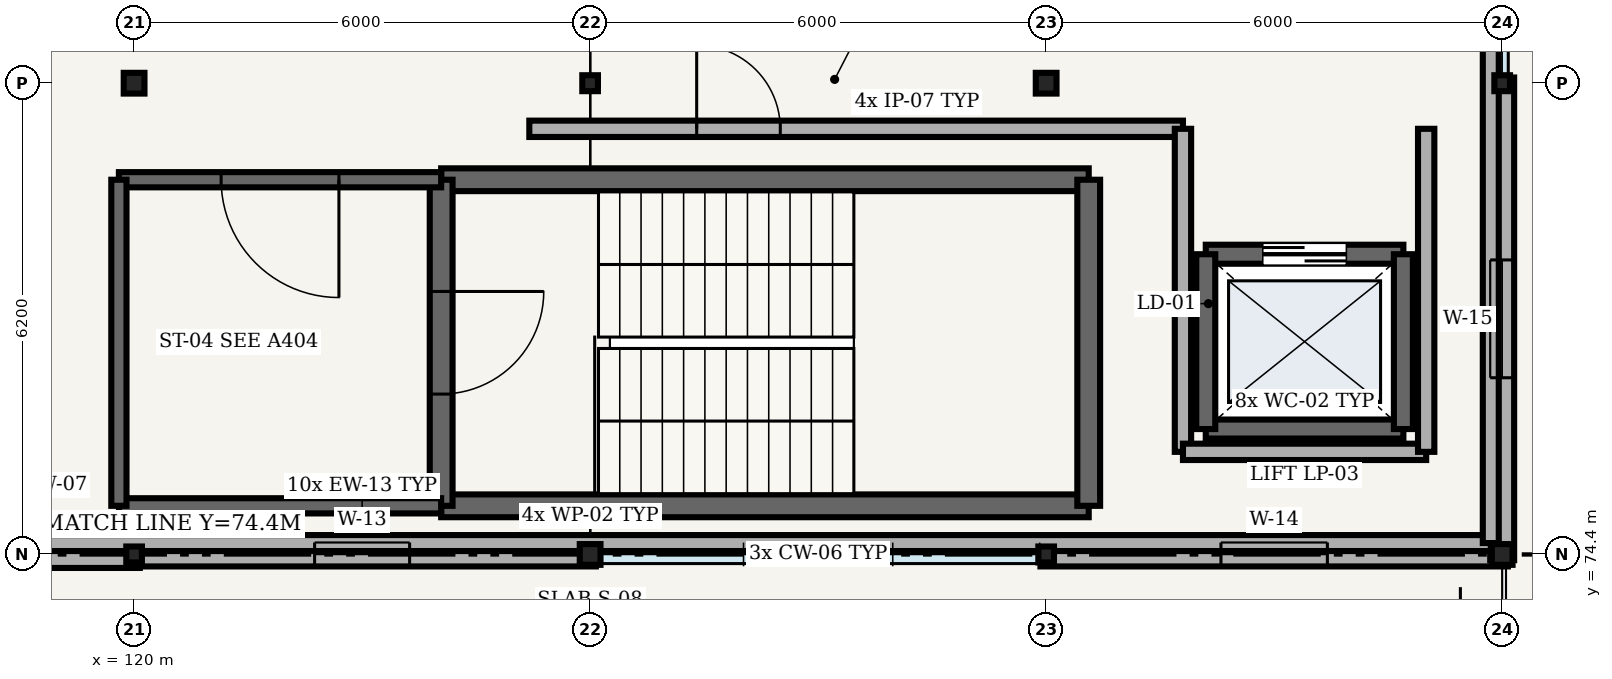
"""IFC4 building model, lengths in metres.
Left out: names, types, materials, properties, quantities, classifications, styles, units other than length and angle.
Written with IfcOpenShell. Run it as: python <this file> out.ifc"""

import sys

from ifc_helpers import new_model, si_unit, direction, frame, frame_2d, origin, origin_2d, place, context, subcontext, project, spatial, rectangle, hollow_circle, i_section, extrude, element, fill, save


model = new_model("IFC4")
c1 = context("Model", 3, precision=1e-05, world=origin(), true_north=direction((0.0, 1.0)))
c2 = subcontext(c1, "Body", "Model", "MODEL_VIEW")
j1 = project(units=[si_unit("LENGTHUNIT", "METRE"), si_unit("PLANEANGLEUNIT", "RADIAN")], contexts=[c1])
p1 = place(None, origin())
s1 = spatial("IfcSite", under=j1, at=p1, CompositionType="ELEMENT")
p2 = place(p1, origin())
s2 = spatial("IfcBuilding", under=s1, at=p2, CompositionType="ELEMENT")
p3 = place(p2, frame((0.0, 0.0, 25.2)))
s3 = spatial("IfcBuildingStorey", under=s2, at=p3, CompositionType="ELEMENT", Elevation=25.2)
p4 = place(p3, frame((120.0, 74.4, 0.0), z_axis=(0.0, 0.0, 1.0), x_axis=(1.0, 0.0, 0.0)))
e1 = element("IfcColumn", 1, at=p4, inside=s3, PredefinedType="COLUMN", context=c2, shape_type="SweptSolid", body=[
    extrude(i_section(OverallWidth=0.206, OverallDepth=0.21, WebThickness=0.01, FlangeThickness=0.014, FilletRadius=0.01, at=origin_2d()), origin(), (0.0, 0.0, 1.0), 4.41),
])
for number, where, z_axis, x_axis in (
    (2, (120.0, 80.6, 0.0), (0.0, 0.0, 1.0), (1.0, 0.0, 0.0)),
    (3, (126.0, 74.4, 0.0), (0.0, 0.0, 1.0), (1.0, 0.0, 0.0)),
):
    element("IfcColumn", number, at=place(p3, frame(where, z_axis=z_axis, x_axis=x_axis)), inside=s3, PredefinedType="COLUMN", context=c2, shape_type="SweptSolid", body=[
        extrude(hollow_circle(Radius=0.136, WallThickness=0.01, at=origin_2d()), origin(), (0.0, 0.0, 1.0), 4.41),
    ])
for number, where, z_axis, x_axis in (
    (4, (126.0, 80.6, 0.0), (0.0, 0.0, 1.0), (1.0, 0.0, 0.0)),
    (5, (132.0, 74.4, 0.0), (0.0, 0.0, 1.0), (1.0, 0.0, 0.0)),
):
    element("IfcColumn", number, at=place(p3, frame(where, z_axis=z_axis, x_axis=x_axis)), inside=s3, PredefinedType="COLUMN", context=c2, shape_type="SweptSolid", body=[
        extrude(i_section(OverallWidth=0.206, OverallDepth=0.21, WebThickness=0.01, FlangeThickness=0.014, FilletRadius=0.01, at=origin_2d()), origin(), (0.0, 0.0, 1.0), 4.41),
    ])
for number, where, z_axis, x_axis in (
    (6, (132.0, 80.6, 0.0), (0.0, 0.0, 1.0), (1.0, 0.0, 0.0)),
    (7, (138.0, 74.4, 0.0), (0.0, 0.0, 1.0), (1.0, 0.0, 0.0)),
):
    element("IfcColumn", number, at=place(p3, frame(where, z_axis=z_axis, x_axis=x_axis)), inside=s3, PredefinedType="COLUMN", context=c2, shape_type="SweptSolid", body=[
        extrude(hollow_circle(Radius=0.136, WallThickness=0.01, at=origin_2d()), origin(), (0.0, 0.0, 1.0), 4.41),
    ])
p5 = place(p3, frame((138.0, 80.6, 0.0), z_axis=(0.0, 0.0, 1.0), x_axis=(1.0, 0.0, 0.0)))
e8 = element("IfcColumn", 8, at=p5, inside=s3, PredefinedType="COLUMN", context=c2, shape_type="SweptSolid", body=[
    extrude(i_section(OverallWidth=0.206, OverallDepth=0.21, WebThickness=0.01, FlangeThickness=0.014, FilletRadius=0.01, at=origin_2d()), origin(), (0.0, 0.0, 1.0), 4.41),
])
p6 = place(p3, frame((113.925, 74.4, 0.0), z_axis=(0.0, 0.0, 1.0), x_axis=(1.0, 0.0, 0.0)))
e9 = element("IfcWall", 9, at=p6, inside=s3, PredefinedType="SOLIDWALL", context=c2, shape_type="SweptSolid", body=[
    extrude(rectangle(XDim=6.15, YDim=0.355, at=frame_2d((3.075, 0.0))), origin(), (0.0, 0.0, 1.0), 3.92),
])
p7 = place(p6, frame((2.475, 0.0, 0.0)))
e10 = element("IfcOpeningElement", 10, at=p7, cuts=e9, PredefinedType="OPENING", context=c2, shape_type="SweptSolid", body=[
    extrude(rectangle(XDim=1.2, YDim=2.2, at=frame_2d((0.6, 1.1))), frame((0.0, 0.188, 0.0), z_axis=(0.0, -1.0, 0.0), x_axis=(1.0, 0.0, 0.0)), (0.0, 0.0, 1.0), 0.375),
])
p8 = place(p3, frame((119.925, 74.4, 0.0), z_axis=(0.0, 0.0, 1.0), x_axis=(1.0, 0.0, 0.0)))
e11 = element("IfcWall", 11, at=p8, inside=s3, PredefinedType="SOLIDWALL", context=c2, shape_type="SweptSolid", body=[
    extrude(rectangle(XDim=6.15, YDim=0.315, at=frame_2d((3.075, 0.0))), origin(), (0.0, 0.0, 1.0), 3.92),
])
p9 = place(p8, frame((2.45, 0.0, 0.9)))
e12 = element("IfcOpeningElement", 12, at=p9, cuts=e11, PredefinedType="OPENING", context=c2, shape_type="SweptSolid", body=[
    extrude(rectangle(XDim=1.25, YDim=1.5, at=frame_2d((0.625, 0.75))), frame((0.0, 0.167, 0.0), z_axis=(0.0, -1.0, 0.0), x_axis=(1.0, 0.0, 0.0)), (0.0, 0.0, 1.0), 0.335),
])
p10 = place(p3, frame((131.925, 74.4, 0.0), z_axis=(0.0, 0.0, 1.0), x_axis=(1.0, 0.0, 0.0)))
e13 = element("IfcWall", 13, at=p10, inside=s3, PredefinedType="SOLIDWALL", context=c2, shape_type="SweptSolid", body=[
    extrude(rectangle(XDim=6.15, YDim=0.315, at=frame_2d((3.075, 0.0))), origin(), (0.0, 0.0, 1.0), 3.92),
])
p11 = place(p10, frame((2.375, 0.0, 0.9)))
e14 = element("IfcOpeningElement", 14, at=p11, cuts=e13, PredefinedType="OPENING", context=c2, shape_type="SweptSolid", body=[
    extrude(rectangle(XDim=1.4, YDim=1.5, at=frame_2d((0.7, 0.75))), frame((0.0, 0.167, 0.0), z_axis=(0.0, -1.0, 0.0), x_axis=(1.0, 0.0, 0.0)), (0.0, 0.0, 1.0), 0.335),
])
p12 = place(p3, frame((138.0, 74.325, 0.0), z_axis=(0.0, 0.0, 1.0), x_axis=(0.0, 1.0, 0.0)))
e15 = element("IfcWall", 15, at=p12, inside=s3, PredefinedType="SOLIDWALL", context=c2, shape_type="SweptSolid", body=[
    extrude(rectangle(XDim=6.35, YDim=0.315, at=frame_2d((3.175, 0.0))), origin(), (0.0, 0.0, 1.0), 3.92),
])
p13 = place(p12, frame((2.4, 0.0, 0.9)))
e16 = element("IfcOpeningElement", 16, at=p13, cuts=e15, PredefinedType="OPENING", context=c2, shape_type="SweptSolid", body=[
    extrude(rectangle(XDim=1.55, YDim=1.5, at=frame_2d((0.775, 0.75))), frame((0.0, 0.167, 0.0), z_axis=(0.0, -1.0, 0.0), x_axis=(1.0, 0.0, 0.0)), (0.0, 0.0, 1.0), 0.335),
])
p14 = place(p3, frame((114.15, 74.55, 4.6), z_axis=(0.0, 0.0, 1.0), x_axis=(1.0, 0.0, 0.0)))
e17 = element("IfcWall", 17, at=p14, inside=s3, PredefinedType="PARAPET", context=c2, shape_type="SweptSolid", body=[
    extrude(rectangle(XDim=23.7, YDim=0.21, at=frame_2d((11.85, 0.0))), origin(), (0.0, 0.0, 1.0), 0.9),
])
p15 = place(p3, frame((137.85, 74.55, 4.6), z_axis=(0.0, 0.0, 1.0), x_axis=(0.0, 1.0, 0.0)))
e18 = element("IfcWall", 18, at=p15, inside=s3, PredefinedType="PARAPET", context=c2, shape_type="SweptSolid", body=[
    extrude(rectangle(XDim=36.9, YDim=0.21, at=frame_2d((18.45, 0.0))), origin(), (0.0, 0.0, 1.0), 0.9),
])
for number, where, z_axis, x_axis in (
    (19, (124.04, 75.04, 0.0), (0.0, 0.0, 1.0), (1.0, 0.0, 0.0)),
    (20, (132.56, 79.33, 0.0), (0.0, 0.0, 1.0), (-1.0, 0.0, 0.0)),
):
    element("IfcWall", number, at=place(p3, frame(where, z_axis=z_axis, x_axis=x_axis)), inside=s3, PredefinedType="SHEAR", context=c2, shape_type="SweptSolid", body=[
        extrude(rectangle(XDim=8.52, YDim=0.3, at=frame_2d((4.26, 0.0))), origin(), (0.0, 0.0, 1.0), 3.85),
    ])
p16 = place(p3, frame((124.04, 79.33, 0.0), z_axis=(0.0, 0.0, 1.0), x_axis=(0.0, -1.0, 0.0)))
e21 = element("IfcWall", 21, at=p16, inside=s3, PredefinedType="SHEAR", context=c2, shape_type="SweptSolid", body=[
    extrude(rectangle(XDim=4.29, YDim=0.3, at=frame_2d((2.145, 0.0))), origin(), (0.0, 0.0, 1.0), 3.85),
])
p17 = place(p16, frame((1.47, 0.0, 0.0)))
e22 = element("IfcOpeningElement", 22, at=p17, cuts=e21, PredefinedType="OPENING", context=c2, shape_type="SweptSolid", body=[
    extrude(rectangle(XDim=1.35, YDim=2.2, at=frame_2d((0.675, 1.1))), frame((0.0, 0.16, 0.0), z_axis=(0.0, -1.0, 0.0), x_axis=(1.0, 0.0, 0.0)), (0.0, 0.0, 1.0), 0.32),
])
p18 = place(p3, frame((132.56, 75.04, 0.0), z_axis=(0.0, 0.0, 1.0), x_axis=(0.0, 1.0, 0.0)))
e23 = element("IfcWall", 23, at=p18, inside=s3, PredefinedType="SHEAR", context=c2, shape_type="SweptSolid", body=[
    extrude(rectangle(XDim=4.29, YDim=0.3, at=frame_2d((2.145, 0.0))), origin(), (0.0, 0.0, 1.0), 3.85),
])
p19 = place(p3, frame((119.8, 75.04, 0.0), z_axis=(0.0, 0.0, 1.0), x_axis=(1.0, 0.0, 0.0)))
e24 = element("IfcWall", 24, at=p19, inside=s3, PredefinedType="SHEAR", context=c2, shape_type="SweptSolid", body=[
    extrude(rectangle(XDim=4.24, YDim=0.2, at=frame_2d((2.12, 0.0))), origin(), (0.0, 0.0, 1.0), 3.85),
])
p20 = place(p3, frame((124.04, 79.33, 0.0), z_axis=(0.0, 0.0, 1.0), x_axis=(-1.0, 0.0, 0.0)))
e25 = element("IfcWall", 25, at=p20, inside=s3, PredefinedType="SHEAR", context=c2, shape_type="SweptSolid", body=[
    extrude(rectangle(XDim=4.24, YDim=0.2, at=frame_2d((2.12, 0.0))), origin(), (0.0, 0.0, 1.0), 3.85),
])
p21 = place(p20, frame((1.345, 0.0, 0.0)))
e26 = element("IfcOpeningElement", 26, at=p21, cuts=e25, PredefinedType="OPENING", context=c2, shape_type="SweptSolid", body=[
    extrude(rectangle(XDim=1.55, YDim=2.2, at=frame_2d((0.775, 1.1))), frame((0.0, 0.11, 0.0), z_axis=(0.0, -1.0, 0.0), x_axis=(1.0, 0.0, 0.0)), (0.0, 0.0, 1.0), 0.22),
])
p22 = place(p3, frame((119.8, 79.33, 0.0), z_axis=(0.0, 0.0, 1.0), x_axis=(0.0, -1.0, 0.0)))
e27 = element("IfcWall", 27, at=p22, inside=s3, PredefinedType="SHEAR", context=c2, shape_type="SweptSolid", body=[
    extrude(rectangle(XDim=4.29, YDim=0.2, at=frame_2d((2.145, 0.0))), origin(), (0.0, 0.0, 1.0), 3.85),
])
p23 = place(p3, frame((134.1, 76.05, 0.0), z_axis=(0.0, 0.0, 1.0), x_axis=(1.0, 0.0, 0.0)))
e28 = element("IfcWall", 28, at=p23, inside=s3, PredefinedType="SHEAR", context=c2, shape_type="SweptSolid", body=[
    extrude(rectangle(XDim=2.6, YDim=0.25, at=frame_2d((1.3, 0.0))), origin(), (0.0, 0.0, 1.0), 3.85),
])
p24 = place(p3, frame((136.7, 78.35, 0.0), z_axis=(0.0, 0.0, 1.0), x_axis=(-1.0, 0.0, 0.0)))
e29 = element("IfcWall", 29, at=p24, inside=s3, PredefinedType="SHEAR", context=c2, shape_type="SweptSolid", body=[
    extrude(rectangle(XDim=2.6, YDim=0.25, at=frame_2d((1.3, 0.0))), origin(), (0.0, 0.0, 1.0), 3.85),
])
p25 = place(p24, frame((0.75, 0.0, 0.0)))
e30 = element("IfcOpeningElement", 30, at=p25, cuts=e29, PredefinedType="OPENING", context=c2, shape_type="SweptSolid", body=[
    extrude(rectangle(XDim=1.1, YDim=2.15, at=frame_2d((0.55, 1.075))), frame((0.0, 0.135, 0.0), z_axis=(0.0, -1.0, 0.0), x_axis=(1.0, 0.0, 0.0)), (0.0, 0.0, 1.0), 0.27),
])
for number, where, z_axis, x_axis in (
    (31, (134.1, 78.35, 0.0), (0.0, 0.0, 1.0), (0.0, -1.0, 0.0)),
    (32, (136.7, 76.05, 0.0), (0.0, 0.0, 1.0), (0.0, 1.0, 0.0)),
):
    element("IfcWall", number, at=place(p3, frame(where, z_axis=z_axis, x_axis=x_axis)), inside=s3, PredefinedType="SHEAR", context=c2, shape_type="SweptSolid", body=[
        extrude(rectangle(XDim=2.3, YDim=0.25, at=frame_2d((1.15, 0.0))), origin(), (0.0, 0.0, 1.0), 3.85),
    ])
p26 = place(p3, frame((125.2, 80.0, 0.0), z_axis=(0.0, 0.0, 1.0), x_axis=(1.0, 0.0, 0.0)))
e33 = element("IfcWall", 33, at=p26, inside=s3, PredefinedType="PARTITIONING", context=c2, shape_type="SweptSolid", body=[
    extrude(rectangle(XDim=8.6, YDim=0.215, at=frame_2d((4.3, 0.0))), origin(), (0.0, 0.0, 1.0), 3.85),
])
p27 = place(p26, frame((2.202, 0.0, 0.0)))
e34 = element("IfcOpeningElement", 34, at=p27, cuts=e33, PredefinedType="OPENING", context=c2, shape_type="SweptSolid", body=[
    extrude(rectangle(XDim=1.1, YDim=2.25, at=frame_2d((0.55, 1.125))), frame((0.0, 0.117, 0.0), z_axis=(0.0, -1.0, 0.0), x_axis=(1.0, 0.0, 0.0)), (0.0, 0.0, 1.0), 0.235),
])
p28 = place(p3, frame((133.8, 80.0, 0.0), z_axis=(0.0, 0.0, 1.0), x_axis=(0.0, -1.0, 0.0)))
e35 = element("IfcWall", 35, at=p28, inside=s3, PredefinedType="PARTITIONING", context=c2, shape_type="SweptSolid", body=[
    extrude(rectangle(XDim=4.25, YDim=0.215, at=frame_2d((2.125, 0.0))), origin(), (0.0, 0.0, 1.0), 3.85),
])
p29 = place(p3, frame((133.8, 75.75, 0.0), z_axis=(0.0, 0.0, 1.0), x_axis=(1.0, 0.0, 0.0)))
e36 = element("IfcWall", 36, at=p29, inside=s3, PredefinedType="PARTITIONING", context=c2, shape_type="SweptSolid", body=[
    extrude(rectangle(XDim=3.2, YDim=0.215, at=frame_2d((1.6, 0.0))), origin(), (0.0, 0.0, 1.0), 3.85),
])
p30 = place(p3, frame((137.0, 75.75, 0.0), z_axis=(0.0, 0.0, 1.0), x_axis=(0.0, 1.0, 0.0)))
e37 = element("IfcWall", 37, at=p30, inside=s3, PredefinedType="PARTITIONING", context=c2, shape_type="SweptSolid", body=[
    extrude(rectangle(XDim=4.25, YDim=0.215, at=frame_2d((2.125, 0.0))), origin(), (0.0, 0.0, 1.0), 3.85),
])
p31 = place(p9, origin())
e38 = element("IfcWindow", 38, at=p31, inside=s3, PartitioningType="SINGLE_PANEL", PredefinedType="WINDOW", context=c2, shape_type="SweptSolid", body=[
    extrude(rectangle(XDim=1.25, YDim=1.5, at=frame_2d((0.625, 0.75))), frame((0.0, 0.03, 0.0), z_axis=(0.0, -1.0, 0.0), x_axis=(1.0, 0.0, 0.0)), (0.0, 0.0, 1.0), 0.06),
])
fill(e12, e38)
p32 = place(p11, origin())
e39 = element("IfcWindow", 39, at=p32, inside=s3, PartitioningType="SINGLE_PANEL", PredefinedType="WINDOW", context=c2, shape_type="SweptSolid", body=[
    extrude(rectangle(XDim=1.4, YDim=1.5, at=frame_2d((0.7, 0.75))), frame((0.0, 0.03, 0.0), z_axis=(0.0, -1.0, 0.0), x_axis=(1.0, 0.0, 0.0)), (0.0, 0.0, 1.0), 0.06),
])
fill(e14, e39)
p33 = place(p13, origin())
e40 = element("IfcWindow", 40, at=p33, inside=s3, PartitioningType="SINGLE_PANEL", PredefinedType="WINDOW", context=c2, shape_type="SweptSolid", body=[
    extrude(rectangle(XDim=1.55, YDim=1.5, at=frame_2d((0.775, 0.75))), frame((0.0, 0.03, 0.0), z_axis=(0.0, -1.0, 0.0), x_axis=(1.0, 0.0, 0.0)), (0.0, 0.0, 1.0), 0.06),
])
fill(e16, e40)
p34 = place(p17, origin())
e41 = element("IfcDoor", 41, at=p34, inside=s3, OperationType="SINGLE_SWING_LEFT", PredefinedType="DOOR", context=c2, shape_type="SweptSolid", body=[
    extrude(rectangle(XDim=1.35, YDim=2.2, at=frame_2d((0.675, 1.1))), frame((0.0, 0.025, 0.0), z_axis=(0.0, -1.0, 0.0), x_axis=(1.0, 0.0, 0.0)), (0.0, 0.0, 1.0), 0.05),
])
fill(e22, e41)
p35 = place(p21, origin())
e42 = element("IfcDoor", 42, at=p35, inside=s3, OperationType="SINGLE_SWING_LEFT", PredefinedType="DOOR", context=c2, shape_type="SweptSolid", body=[
    extrude(rectangle(XDim=1.55, YDim=2.2, at=frame_2d((0.775, 1.1))), frame((0.0, 0.025, 0.0), z_axis=(0.0, -1.0, 0.0), x_axis=(1.0, 0.0, 0.0)), (0.0, 0.0, 1.0), 0.05),
])
fill(e26, e42)
p36 = place(p25, origin())
e43 = element("IfcDoor", 43, at=p36, inside=s3, OperationType="DOUBLE_DOOR_SLIDING", PredefinedType="DOOR", context=c2, shape_type="SweptSolid", body=[
    extrude(rectangle(XDim=1.1, YDim=2.15, at=frame_2d((0.55, 1.075))), frame((0.0, 0.025, 0.0), z_axis=(0.0, -1.0, 0.0), x_axis=(1.0, 0.0, 0.0)), (0.0, 0.0, 1.0), 0.05),
])
fill(e30, e43)
p37 = place(p27, origin())
e44 = element("IfcDoor", 44, at=p37, inside=s3, OperationType="SINGLE_SWING_LEFT", PredefinedType="DOOR", context=c2, shape_type="SweptSolid", body=[
    extrude(rectangle(XDim=1.1, YDim=2.25, at=frame_2d((0.55, 1.125))), frame((0.0, 0.025, 0.0), z_axis=(0.0, -1.0, 0.0), x_axis=(1.0, 0.0, 0.0)), (0.0, 0.0, 1.0), 0.05),
])
fill(e34, e44)
save(model, sys.argv[1])
